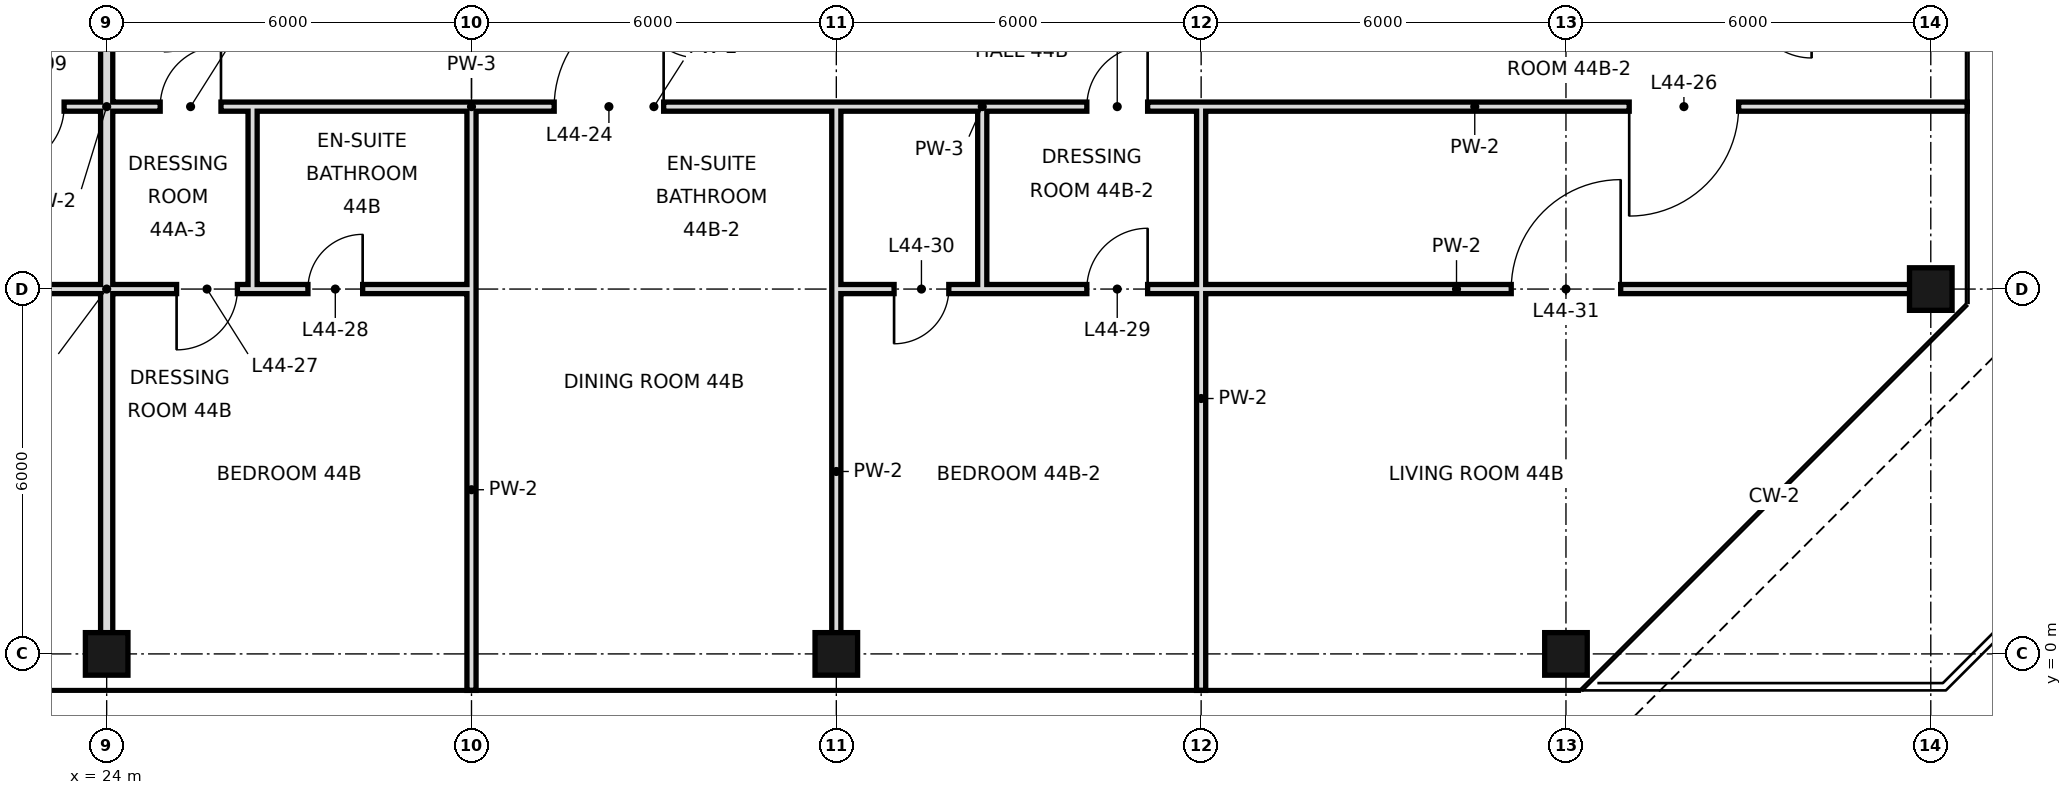
"""IFC4 building model, lengths in metres.
Left out: names, types, materials, properties, quantities, classifications, styles, units other than length and angle.
Written with IfcOpenShell. Run it as: python <this file> out.ifc"""

import sys

from ifc_helpers import new_model, si_unit, direction, frame, frame_2d, origin, origin_2d, place, context, subcontext, project, spatial, rectangle, hollow_rectangle, extrude, element, fill, save


model = new_model("IFC4")
c1 = context("Model", 3, precision=1e-05, world=origin(), true_north=direction((0.0, 1.0)))
c2 = subcontext(c1, "Body", "Model", "MODEL_VIEW")
j1 = project(units=[si_unit("LENGTHUNIT", "METRE"), si_unit("PLANEANGLEUNIT", "RADIAN")], contexts=[c1])
p1 = place(None, origin())
s1 = spatial("IfcSite", under=j1, at=p1, CompositionType="ELEMENT")
p2 = place(p1, origin())
s2 = spatial("IfcBuilding", under=s1, at=p2, CompositionType="ELEMENT")
p3 = place(p2, frame((0.0, 0.0, 192.0)))
s3 = spatial("IfcBuildingStorey", under=s2, at=p3, CompositionType="ELEMENT", Elevation=192.0)
for number, where, z_axis, x_axis in (
    (1, (24.0, 0.0, 0.0), (0.0, 0.0, 1.0), (1.0, 0.0, 0.0)),
    (2, (36.0, 0.0, 0.0), (0.0, 0.0, 1.0), (1.0, 0.0, 0.0)),
    (3, (48.0, 0.0, 0.0), (0.0, 0.0, 1.0), (1.0, 0.0, 0.0)),
):
    element("IfcColumn", number, at=place(p3, frame(where, z_axis=z_axis, x_axis=x_axis)), inside=s3, PredefinedType="COLUMN", context=c2, shape_type="SweptSolid", body=[
        extrude(hollow_rectangle(XDim=0.7, YDim=0.7, WallThickness=0.036, at=origin_2d()), origin(), (0.0, 0.0, 1.0), 3.6),
    ])
p4 = place(p3, frame((54.0, 6.0, -0.3), z_axis=(0.0, 0.0, 1.0), x_axis=(1.0, 0.0, 0.0)))
e4 = element("IfcColumn", 4, at=p4, inside=s3, PredefinedType="COLUMN", context=c2, shape_type="SweptSolid", body=[
    extrude(hollow_rectangle(XDim=0.7, YDim=0.7, WallThickness=0.036, at=origin_2d()), origin(), (0.0, 0.0, 1.0), 3.9),
])
p5 = place(p3, frame((24.0, 0.0, 0.0), z_axis=(0.0, 0.0, 1.0), x_axis=(0.0, 1.0, 0.0)))
e5 = element("IfcWall", 5, at=p5, inside=s3, PredefinedType="SOLIDWALL", context=c2, shape_type="SweptSolid", body=[
    extrude(rectangle(XDim=15.3, YDim=0.2, at=frame_2d((7.65, 0.0))), origin(), (0.0, 0.0, 1.0), 2.72),
])
p6 = place(p3, frame((26.4, 6.0, 0.0), z_axis=(0.0, 0.0, 1.0), x_axis=(0.0, 1.0, 0.0)))
e6 = element("IfcWall", 6, at=p6, inside=s3, PredefinedType="PARTITIONING", context=c2, shape_type="SweptSolid", body=[
    extrude(rectangle(XDim=3.0, YDim=0.15, at=frame_2d((1.5, 0.0))), origin(), (0.0, 0.0, 1.0), 3.42),
])
p7 = place(p3, frame((30.0, -0.6, 0.0), z_axis=(0.0, 0.0, 1.0), x_axis=(0.0, 1.0, 0.0)))
e7 = element("IfcWall", 7, at=p7, inside=s3, PredefinedType="PARTITIONING", context=c2, shape_type="SweptSolid", body=[
    extrude(rectangle(XDim=6.6, YDim=0.15, at=frame_2d((3.3, 0.0))), origin(), (0.0, 0.0, 1.0), 2.72),
])
p8 = place(p3, frame((30.0, 6.0, 0.0), z_axis=(0.0, 0.0, 1.0), x_axis=(0.0, 1.0, 0.0)))
e8 = element("IfcWall", 8, at=p8, inside=s3, PredefinedType="PARTITIONING", context=c2, shape_type="SweptSolid", body=[
    extrude(rectangle(XDim=3.0, YDim=0.15, at=frame_2d((1.5, 0.0))), origin(), (0.0, 0.0, 1.0), 2.72),
])
p9 = place(p3, frame((36.0, 0.0, 0.0), z_axis=(0.0, 0.0, 1.0), x_axis=(0.0, 1.0, 0.0)))
e9 = element("IfcWall", 9, at=p9, inside=s3, PredefinedType="PARTITIONING", context=c2, shape_type="SweptSolid", body=[
    extrude(rectangle(XDim=6.0, YDim=0.15, at=frame_2d((3.0, 0.0))), origin(), (0.0, 0.0, 1.0), 2.72),
])
p10 = place(p3, frame((36.0, 6.0, 0.0), z_axis=(0.0, 0.0, 1.0), x_axis=(0.0, 1.0, 0.0)))
e10 = element("IfcWall", 10, at=p10, inside=s3, PredefinedType="PARTITIONING", context=c2, shape_type="SweptSolid", body=[
    extrude(rectangle(XDim=3.0, YDim=0.15, at=frame_2d((1.5, 0.0))), origin(), (0.0, 0.0, 1.0), 2.72),
])
p11 = place(p3, frame((38.4, 6.0, 0.0), z_axis=(0.0, 0.0, 1.0), x_axis=(0.0, 1.0, 0.0)))
e11 = element("IfcWall", 11, at=p11, inside=s3, PredefinedType="PARTITIONING", context=c2, shape_type="SweptSolid", body=[
    extrude(rectangle(XDim=3.0, YDim=0.15, at=frame_2d((1.5, 0.0))), origin(), (0.0, 0.0, 1.0), 3.42),
])
p12 = place(p3, frame((42.0, -0.6, 0.0), z_axis=(0.0, 0.0, 1.0), x_axis=(0.0, 1.0, 0.0)))
e12 = element("IfcWall", 12, at=p12, inside=s3, PredefinedType="PARTITIONING", context=c2, shape_type="SweptSolid", body=[
    extrude(rectangle(XDim=9.6, YDim=0.15, at=frame_2d((4.8, 0.0))), origin(), (0.0, 0.0, 1.0), 2.72),
])
p13 = place(p3, frame((21.6, 6.0, 0.0), z_axis=(0.0, 0.0, 1.0), x_axis=(1.0, 0.0, 0.0)))
e13 = element("IfcWall", 13, at=p13, inside=s3, PredefinedType="PARTITIONING", context=c2, shape_type="SweptSolid", body=[
    extrude(rectangle(XDim=4.8, YDim=0.15, at=frame_2d((2.4, 0.0))), origin(), (0.0, 0.0, 1.0), 2.97),
])
p14 = place(p13, frame((0.25, 0.0, 0.0)))
e14 = element("IfcOpeningElement", 14, at=p14, cuts=e13, PredefinedType="OPENING", context=c2, shape_type="SweptSolid", body=[
    extrude(rectangle(XDim=1.0, YDim=2.4, at=frame_2d((0.5, 1.2))), frame((0.0, 0.085, 0.0), z_axis=(0.0, -1.0, 0.0), x_axis=(1.0, 0.0, 0.0)), (0.0, 0.0, 1.0), 0.17),
])
p15 = place(p13, frame((3.55, 0.0, 0.0)))
e15 = element("IfcOpeningElement", 15, at=p15, cuts=e13, PredefinedType="OPENING", context=c2, shape_type="SweptSolid", body=[
    extrude(rectangle(XDim=1.0, YDim=2.4, at=frame_2d((0.5, 1.2))), frame((0.0, 0.085, 0.0), z_axis=(0.0, -1.0, 0.0), x_axis=(1.0, 0.0, 0.0)), (0.0, 0.0, 1.0), 0.17),
])
p16 = place(p3, frame((38.4, 6.0, 0.0), z_axis=(0.0, 0.0, 1.0), x_axis=(1.0, 0.0, 0.0)))
e16 = element("IfcWall", 16, at=p16, inside=s3, PredefinedType="PARTITIONING", context=c2, shape_type="SweptSolid", body=[
    extrude(rectangle(XDim=15.6, YDim=0.15, at=frame_2d((7.8, 0.0))), origin(), (0.0, 0.0, 1.0), 2.97),
])
p17 = place(p16, frame((1.72, 0.0, 0.0)))
e17 = element("IfcOpeningElement", 17, at=p17, cuts=e16, PredefinedType="OPENING", context=c2, shape_type="SweptSolid", body=[
    extrude(rectangle(XDim=1.0, YDim=2.4, at=frame_2d((0.5, 1.2))), frame((0.0, 0.085, 0.0), z_axis=(0.0, -1.0, 0.0), x_axis=(1.0, 0.0, 0.0)), (0.0, 0.0, 1.0), 0.17),
])
p18 = place(p16, frame((8.7, 0.0, 0.0)))
e18 = element("IfcOpeningElement", 18, at=p18, cuts=e16, PredefinedType="OPENING", context=c2, shape_type="SweptSolid", body=[
    extrude(rectangle(XDim=1.8, YDim=2.4, at=frame_2d((0.9, 1.2))), frame((0.0, 0.085, 0.0), z_axis=(0.0, -1.0, 0.0), x_axis=(1.0, 0.0, 0.0)), (0.0, 0.0, 1.0), 0.17),
])
p19 = place(p3, frame((26.4, 6.0, 0.0), z_axis=(0.0, 0.0, 1.0), x_axis=(1.0, 0.0, 0.0)))
e19 = element("IfcWall", 19, at=p19, inside=s3, PredefinedType="PARTITIONING", context=c2, shape_type="SweptSolid", body=[
    extrude(rectangle(XDim=3.6, YDim=0.15, at=frame_2d((1.8, 0.0))), origin(), (0.0, 0.0, 1.0), 2.97),
])
p20 = place(p19, frame((0.91, 0.0, 0.0)))
e20 = element("IfcOpeningElement", 20, at=p20, cuts=e19, PredefinedType="OPENING", context=c2, shape_type="SweptSolid", body=[
    extrude(rectangle(XDim=0.9, YDim=2.4, at=frame_2d((0.45, 1.2))), frame((0.0, 0.085, 0.0), z_axis=(0.0, -1.0, 0.0), x_axis=(1.0, 0.0, 0.0)), (0.0, 0.0, 1.0), 0.17),
])
p21 = place(p3, frame((36.0, 6.0, 0.0), z_axis=(0.0, 0.0, 1.0), x_axis=(1.0, 0.0, 0.0)))
e21 = element("IfcWall", 21, at=p21, inside=s3, PredefinedType="PARTITIONING", context=c2, shape_type="SweptSolid", body=[
    extrude(rectangle(XDim=2.4, YDim=0.15, at=frame_2d((1.2, 0.0))), origin(), (0.0, 0.0, 1.0), 2.97),
])
p22 = place(p21, frame((0.95, 0.0, 0.0)))
e22 = element("IfcOpeningElement", 22, at=p22, cuts=e21, PredefinedType="OPENING", context=c2, shape_type="SweptSolid", body=[
    extrude(rectangle(XDim=0.9, YDim=2.4, at=frame_2d((0.45, 1.2))), frame((0.0, 0.085, 0.0), z_axis=(0.0, -1.0, 0.0), x_axis=(1.0, 0.0, 0.0)), (0.0, 0.0, 1.0), 0.17),
])
p23 = place(p3, frame((21.6, 9.0, 0.0), z_axis=(0.0, 0.0, 1.0), x_axis=(1.0, 0.0, 0.0)))
e23 = element("IfcWall", 23, at=p23, inside=s3, PredefinedType="PARTITIONING", context=c2, shape_type="SweptSolid", body=[
    extrude(rectangle(XDim=4.8, YDim=0.15, at=frame_2d((2.4, 0.0))), origin(), (0.0, 0.0, 1.0), 3.42),
])
p24 = place(p23, frame((0.7, 0.0, 0.0)))
e24 = element("IfcOpeningElement", 24, at=p24, cuts=e23, PredefinedType="OPENING", context=c2, shape_type="SweptSolid", body=[
    extrude(rectangle(XDim=1.0, YDim=2.4, at=frame_2d((0.5, 1.2))), frame((0.0, 0.085, 0.0), z_axis=(0.0, -1.0, 0.0), x_axis=(1.0, 0.0, 0.0)), (0.0, 0.0, 1.0), 0.17),
])
p25 = place(p23, frame((3.28, 0.0, 0.0)))
e25 = element("IfcOpeningElement", 25, at=p25, cuts=e23, PredefinedType="OPENING", context=c2, shape_type="SweptSolid", body=[
    extrude(rectangle(XDim=1.0, YDim=2.4, at=frame_2d((0.5, 1.2))), frame((0.0, 0.085, 0.0), z_axis=(0.0, -1.0, 0.0), x_axis=(1.0, 0.0, 0.0)), (0.0, 0.0, 1.0), 0.17),
])
p26 = place(p3, frame((30.0, 9.0, 0.0), z_axis=(0.0, 0.0, 1.0), x_axis=(1.0, 0.0, 0.0)))
e26 = element("IfcWall", 26, at=p26, inside=s3, PredefinedType="PARTITIONING", context=c2, shape_type="SweptSolid", body=[
    extrude(rectangle(XDim=6.0, YDim=0.15, at=frame_2d((3.0, 0.0))), origin(), (0.0, 0.0, 1.0), 3.42),
])
p27 = place(p26, frame((1.36, 0.0, 0.0)))
e27 = element("IfcOpeningElement", 27, at=p27, cuts=e26, PredefinedType="OPENING", context=c2, shape_type="SweptSolid", body=[
    extrude(rectangle(XDim=1.8, YDim=2.4, at=frame_2d((0.9, 1.2))), frame((0.0, 0.085, 0.0), z_axis=(0.0, -1.0, 0.0), x_axis=(1.0, 0.0, 0.0)), (0.0, 0.0, 1.0), 0.17),
])
p28 = place(p3, frame((38.4, 9.0, 0.0), z_axis=(0.0, 0.0, 1.0), x_axis=(1.0, 0.0, 0.0)))
e28 = element("IfcWall", 28, at=p28, inside=s3, PredefinedType="PARTITIONING", context=c2, shape_type="SweptSolid", body=[
    extrude(rectangle(XDim=16.2, YDim=0.15, at=frame_2d((8.1, 0.0))), origin(), (0.0, 0.0, 1.0), 3.42),
])
p29 = place(p28, frame((1.72, 0.0, 0.0)))
e29 = element("IfcOpeningElement", 29, at=p29, cuts=e28, PredefinedType="OPENING", context=c2, shape_type="SweptSolid", body=[
    extrude(rectangle(XDim=1.0, YDim=2.4, at=frame_2d((0.5, 1.2))), frame((0.0, 0.085, 0.0), z_axis=(0.0, -1.0, 0.0), x_axis=(1.0, 0.0, 0.0)), (0.0, 0.0, 1.0), 0.17),
])
p30 = place(p28, frame((10.64, 0.0, 0.0)))
e30 = element("IfcOpeningElement", 30, at=p30, cuts=e28, PredefinedType="OPENING", context=c2, shape_type="SweptSolid", body=[
    extrude(rectangle(XDim=1.8, YDim=2.4, at=frame_2d((0.9, 1.2))), frame((0.0, 0.085, 0.0), z_axis=(0.0, -1.0, 0.0), x_axis=(1.0, 0.0, 0.0)), (0.0, 0.0, 1.0), 0.17),
])
p31 = place(p3, frame((26.4, 9.0, 0.0), z_axis=(0.0, 0.0, 1.0), x_axis=(1.0, 0.0, 0.0)))
e31 = element("IfcWall", 31, at=p31, inside=s3, PredefinedType="PARTITIONING", context=c2, shape_type="SweptSolid", body=[
    extrude(rectangle(XDim=3.6, YDim=0.15, at=frame_2d((1.8, 0.0))), origin(), (0.0, 0.0, 1.0), 3.42),
])
p32 = place(p3, frame((36.0, 9.0, 0.0), z_axis=(0.0, 0.0, 1.0), x_axis=(1.0, 0.0, 0.0)))
e32 = element("IfcWall", 32, at=p32, inside=s3, PredefinedType="PARTITIONING", context=c2, shape_type="SweptSolid", body=[
    extrude(rectangle(XDim=2.4, YDim=0.15, at=frame_2d((1.2, 0.0))), origin(), (0.0, 0.0, 1.0), 3.42),
])
p33 = place(p24, frame((1.0, 0.0, 0.0), z_axis=(0.0, 0.0, 1.0), x_axis=(-1.0, 0.0, 0.0)))
e33 = element("IfcDoor", 33, at=p33, inside=s3, OperationType="SINGLE_SWING_RIGHT", PredefinedType="DOOR", context=c2, shape_type="SweptSolid", body=[
    extrude(rectangle(XDim=1.0, YDim=2.4, at=frame_2d((0.5, 1.2))), frame((0.0, 0.025, 0.0), z_axis=(0.0, -1.0, 0.0), x_axis=(1.0, 0.0, 0.0)), (0.0, 0.0, 1.0), 0.05),
])
fill(e24, e33)
p34 = place(p25, frame((1.0, 0.0, 0.0), z_axis=(0.0, 0.0, 1.0), x_axis=(-1.0, 0.0, 0.0)))
e34 = element("IfcDoor", 34, at=p34, inside=s3, OperationType="SINGLE_SWING_LEFT", PredefinedType="DOOR", context=c2, shape_type="SweptSolid", body=[
    extrude(rectangle(XDim=1.0, YDim=2.4, at=frame_2d((0.5, 1.2))), frame((0.0, 0.025, 0.0), z_axis=(0.0, -1.0, 0.0), x_axis=(1.0, 0.0, 0.0)), (0.0, 0.0, 1.0), 0.05),
])
fill(e25, e34)
p35 = place(p27, frame((1.8, 0.0, 0.0), z_axis=(0.0, 0.0, 1.0), x_axis=(-1.0, 0.0, 0.0)))
e35 = element("IfcDoor", 35, at=p35, inside=s3, OperationType="SINGLE_SWING_LEFT", PredefinedType="DOOR", context=c2, shape_type="SweptSolid", body=[
    extrude(rectangle(XDim=1.8, YDim=2.4, at=frame_2d((0.9, 1.2))), frame((0.0, 0.025, 0.0), z_axis=(0.0, -1.0, 0.0), x_axis=(1.0, 0.0, 0.0)), (0.0, 0.0, 1.0), 0.05),
])
fill(e27, e35)
p36 = place(p29, frame((1.0, 0.0, 0.0), z_axis=(0.0, 0.0, 1.0), x_axis=(-1.0, 0.0, 0.0)))
e36 = element("IfcDoor", 36, at=p36, inside=s3, OperationType="SINGLE_SWING_LEFT", PredefinedType="DOOR", context=c2, shape_type="SweptSolid", body=[
    extrude(rectangle(XDim=1.0, YDim=2.4, at=frame_2d((0.5, 1.2))), frame((0.0, 0.025, 0.0), z_axis=(0.0, -1.0, 0.0), x_axis=(1.0, 0.0, 0.0)), (0.0, 0.0, 1.0), 0.05),
])
fill(e29, e36)
p37 = place(p30, frame((1.8, 0.0, 0.0), z_axis=(0.0, 0.0, 1.0), x_axis=(-1.0, 0.0, 0.0)))
e37 = element("IfcDoor", 37, at=p37, inside=s3, OperationType="SINGLE_SWING_RIGHT", PredefinedType="DOOR", context=c2, shape_type="SweptSolid", body=[
    extrude(rectangle(XDim=1.8, YDim=2.4, at=frame_2d((0.9, 1.2))), frame((0.0, 0.025, 0.0), z_axis=(0.0, -1.0, 0.0), x_axis=(1.0, 0.0, 0.0)), (0.0, 0.0, 1.0), 0.05),
])
fill(e30, e37)
p38 = place(p15, frame((1.0, 0.0, 0.0), z_axis=(0.0, 0.0, 1.0), x_axis=(-1.0, 0.0, 0.0)))
e38 = element("IfcDoor", 38, at=p38, inside=s3, OperationType="SINGLE_SWING_RIGHT", PredefinedType="DOOR", context=c2, shape_type="SweptSolid", body=[
    extrude(rectangle(XDim=1.0, YDim=2.4, at=frame_2d((0.5, 1.2))), frame((0.0, 0.025, 0.0), z_axis=(0.0, -1.0, 0.0), x_axis=(1.0, 0.0, 0.0)), (0.0, 0.0, 1.0), 0.05),
])
fill(e15, e38)
p39 = place(p20, frame((0.9, 0.0, 0.0), z_axis=(0.0, 0.0, 1.0), x_axis=(-1.0, 0.0, 0.0)))
e39 = element("IfcDoor", 39, at=p39, inside=s3, OperationType="SINGLE_SWING_LEFT", PredefinedType="DOOR", context=c2, shape_type="SweptSolid", body=[
    extrude(rectangle(XDim=0.9, YDim=2.4, at=frame_2d((0.45, 1.2))), frame((0.0, 0.025, 0.0), z_axis=(0.0, -1.0, 0.0), x_axis=(1.0, 0.0, 0.0)), (0.0, 0.0, 1.0), 0.05),
])
fill(e20, e39)
p40 = place(p17, frame((1.0, 0.0, 0.0), z_axis=(0.0, 0.0, 1.0), x_axis=(-1.0, 0.0, 0.0)))
e40 = element("IfcDoor", 40, at=p40, inside=s3, OperationType="SINGLE_SWING_LEFT", PredefinedType="DOOR", context=c2, shape_type="SweptSolid", body=[
    extrude(rectangle(XDim=1.0, YDim=2.4, at=frame_2d((0.5, 1.2))), frame((0.0, 0.025, 0.0), z_axis=(0.0, -1.0, 0.0), x_axis=(1.0, 0.0, 0.0)), (0.0, 0.0, 1.0), 0.05),
])
fill(e17, e40)
p41 = place(p22, frame((0.9, 0.0, 0.0), z_axis=(0.0, 0.0, 1.0), x_axis=(-1.0, 0.0, 0.0)))
e41 = element("IfcDoor", 41, at=p41, inside=s3, OperationType="SINGLE_SWING_RIGHT", PredefinedType="DOOR", context=c2, shape_type="SweptSolid", body=[
    extrude(rectangle(XDim=0.9, YDim=2.4, at=frame_2d((0.45, 1.2))), frame((0.0, 0.025, 0.0), z_axis=(0.0, -1.0, 0.0), x_axis=(1.0, 0.0, 0.0)), (0.0, 0.0, 1.0), 0.05),
])
fill(e22, e41)
p42 = place(p18, frame((1.8, 0.0, 0.0), z_axis=(0.0, 0.0, 1.0), x_axis=(-1.0, 0.0, 0.0)))
e42 = element("IfcDoor", 42, at=p42, inside=s3, OperationType="SINGLE_SWING_LEFT", PredefinedType="DOOR", context=c2, shape_type="SweptSolid", body=[
    extrude(rectangle(XDim=1.8, YDim=2.4, at=frame_2d((0.9, 1.2))), frame((0.0, 0.025, 0.0), z_axis=(0.0, -1.0, 0.0), x_axis=(1.0, 0.0, 0.0)), (0.0, 0.0, 1.0), 0.05),
])
fill(e18, e42)
save(model, sys.argv[1])
